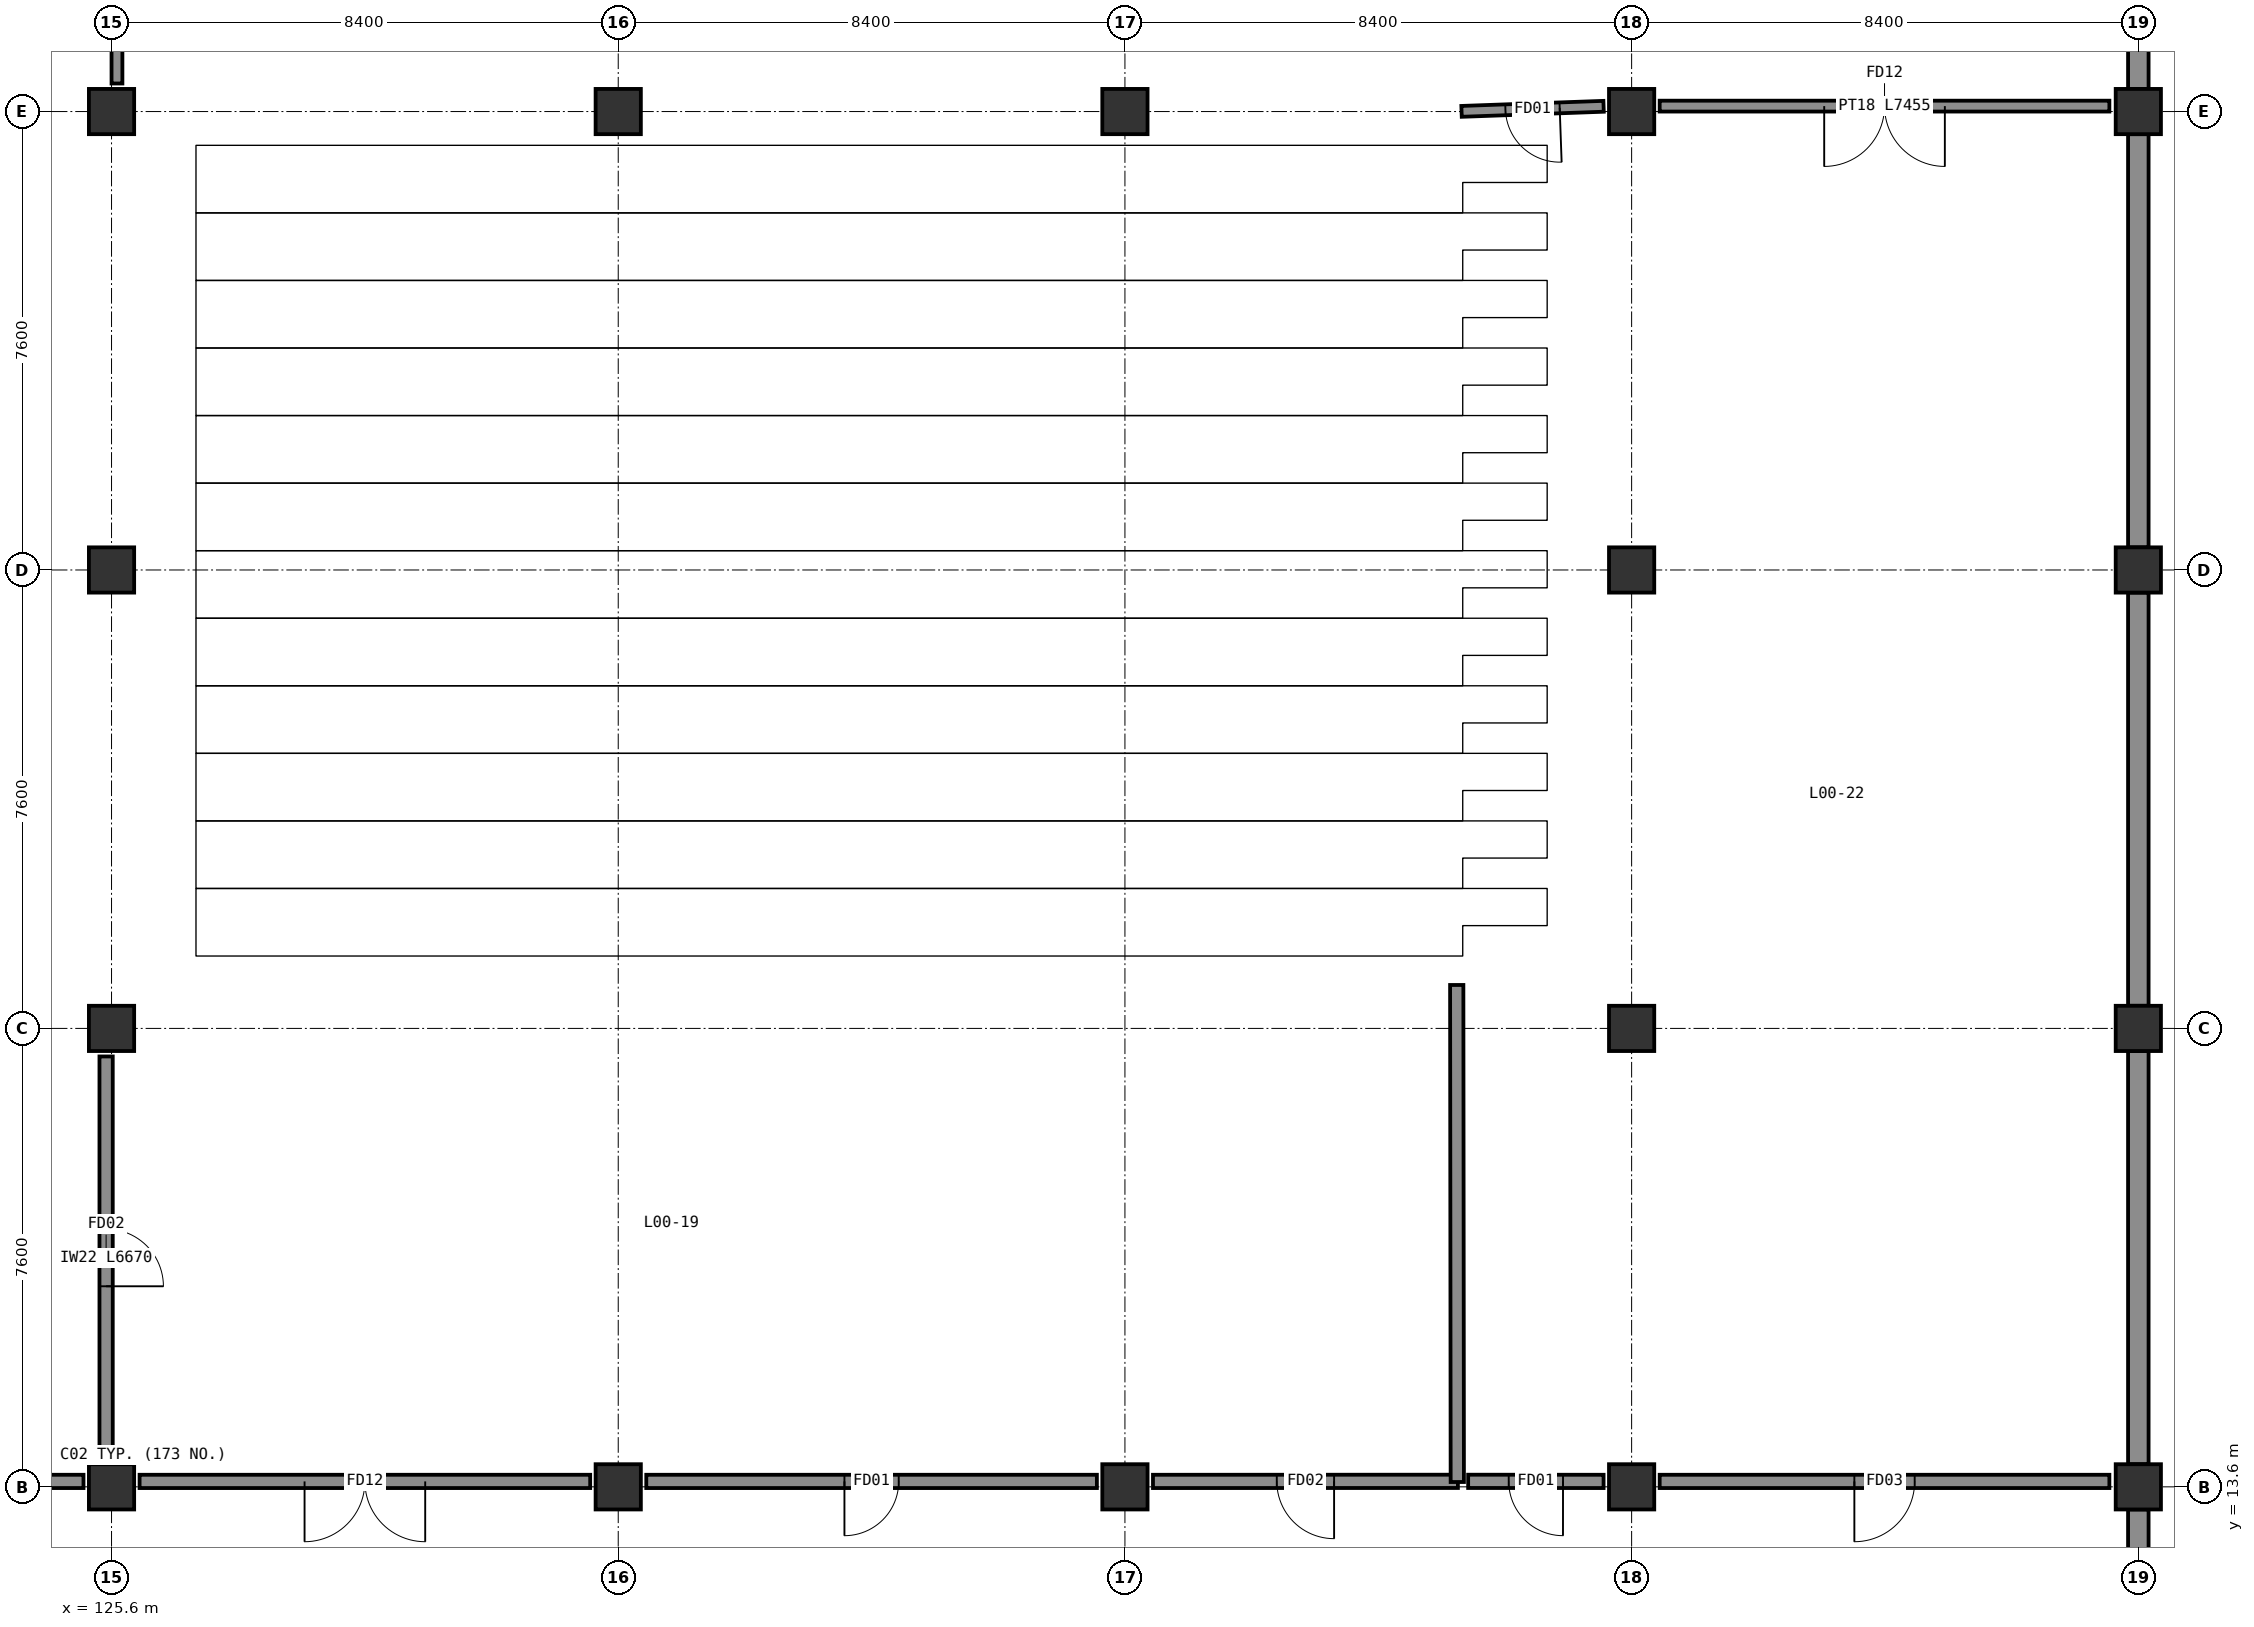
"""IFC4 building model, lengths in metres.
Left out: names, types, materials, properties, quantities, classifications, styles, units other than length and angle.
Written with IfcOpenShell. Run it as: python <this file> out.ifc"""

import sys

from ifc_helpers import new_model, si_unit, direction, frame, frame_2d, origin, origin_2d, place, context, subcontext, project, spatial, rectangle, extrude, element, fill, save


model = new_model("IFC4")
c1 = context("Model", 3, precision=1e-05, world=origin(), true_north=direction((0.0, 1.0)))
c2 = subcontext(c1, "Body", "Model", "MODEL_VIEW")
j1 = project(units=[si_unit("LENGTHUNIT", "METRE"), si_unit("PLANEANGLEUNIT", "RADIAN")], contexts=[c1])
p1 = place(None, origin())
s1 = spatial("IfcSite", under=j1, at=p1, CompositionType="ELEMENT")
p2 = place(p1, origin())
s2 = spatial("IfcBuilding", under=s1, at=p2, CompositionType="ELEMENT")
p3 = place(p2, origin())
s3 = spatial("IfcBuildingStorey", under=s2, at=p3, CompositionType="ELEMENT", Elevation=0.0)
for number, where, z_axis, x_axis in (
    (1, (125.6, 13.6, 0.0), (0.0, 0.0, 1.0), (1.0, 0.0, 0.0)),
    (2, (134.0, 13.6, 0.0), (0.0, 0.0, 1.0), (1.0, 0.0, 0.0)),
    (3, (142.4, 13.6, 0.0), (0.0, 0.0, 1.0), (1.0, 0.0, 0.0)),
    (4, (150.8, 13.6, 0.0), (0.0, 0.0, 1.0), (1.0, 0.0, 0.0)),
    (5, (159.2, 13.6, 0.0), (0.0, 0.0, 1.0), (1.0, 0.0, 0.0)),
    (6, (125.6, 21.2, 0.0), (0.0, 0.0, 1.0), (1.0, 0.0, 0.0)),
    (7, (150.8, 21.2, 0.0), (0.0, 0.0, 1.0), (1.0, 0.0, 0.0)),
    (8, (159.2, 21.2, 0.0), (0.0, 0.0, 1.0), (1.0, 0.0, 0.0)),
    (9, (125.6, 28.8, 0.0), (0.0, 0.0, 1.0), (1.0, 0.0, 0.0)),
    (10, (150.8, 28.8, 0.0), (0.0, 0.0, 1.0), (1.0, 0.0, 0.0)),
    (11, (159.2, 28.8, 0.0), (0.0, 0.0, 1.0), (1.0, 0.0, 0.0)),
    (12, (125.6, 36.4, 0.0), (0.0, 0.0, 1.0), (1.0, 0.0, 0.0)),
    (13, (134.0, 36.4, 0.0), (0.0, 0.0, 1.0), (1.0, 0.0, 0.0)),
    (14, (142.4, 36.4, 0.0), (0.0, 0.0, 1.0), (1.0, 0.0, 0.0)),
    (15, (150.8, 36.4, 0.0), (0.0, 0.0, 1.0), (1.0, 0.0, 0.0)),
    (16, (159.2, 36.4, 0.0), (0.0, 0.0, 1.0), (1.0, 0.0, 0.0)),
):
    element("IfcColumn", number, at=place(p3, frame(where, z_axis=z_axis, x_axis=x_axis)), inside=s3, PredefinedType="COLUMN", context=c2, shape_type="SweptSolid", body=[
        extrude(rectangle(XDim=0.75, YDim=0.75, at=origin_2d()), origin(), (0.0, 0.0, 1.0), 4.8),
    ])
p4 = place(p3, frame((159.2, 6.45, 0.0), z_axis=(0.0, 0.0, 1.0), x_axis=(0.0, 1.0, 0.0)))
e17 = element("IfcWall", 17, at=p4, inside=s3, PredefinedType="SOLIDWALL", context=c2, shape_type="SweptSolid", body=[
    extrude(rectangle(XDim=6.775, YDim=0.34, at=frame_2d((3.388, 0.0))), origin(), (0.0, 0.0, 1.0), 4.237),
])
p5 = place(p4, frame((2.087, 0.0, 0.0)))
e18 = element("IfcOpeningElement", 18, at=p5, cuts=e17, PredefinedType="OPENING", context=c2, shape_type="SweptSolid", body=[
    extrude(rectangle(XDim=2.6, YDim=2.2, at=frame_2d((1.3, 1.1))), frame((0.0, 0.18, 0.0), z_axis=(0.0, -1.0, 0.0), x_axis=(1.0, 0.0, 0.0)), (0.0, 0.0, 1.0), 0.36),
])
p6 = place(p3, frame((159.2, 13.975, 0.0), z_axis=(0.0, 0.0, 1.0), x_axis=(0.0, 1.0, 0.0)))
e19 = element("IfcWall", 19, at=p6, inside=s3, PredefinedType="SOLIDWALL", context=c2, shape_type="SweptSolid", body=[
    extrude(rectangle(XDim=6.85, YDim=0.34, at=frame_2d((3.425, 0.0))), origin(), (0.0, 0.0, 1.0), 4.237),
])
p7 = place(p3, frame((159.2, 21.575, 0.0), z_axis=(0.0, 0.0, 1.0), x_axis=(0.0, 1.0, 0.0)))
e20 = element("IfcWall", 20, at=p7, inside=s3, PredefinedType="SOLIDWALL", context=c2, shape_type="SweptSolid", body=[
    extrude(rectangle(XDim=6.85, YDim=0.34, at=frame_2d((3.425, 0.0))), origin(), (0.0, 0.0, 1.0), 4.237),
])
p8 = place(p3, frame((159.2, 29.175, 0.0), z_axis=(0.0, 0.0, 1.0), x_axis=(0.0, 1.0, 0.0)))
e21 = element("IfcWall", 21, at=p8, inside=s3, PredefinedType="SOLIDWALL", context=c2, shape_type="SweptSolid", body=[
    extrude(rectangle(XDim=6.85, YDim=0.34, at=frame_2d((3.425, 0.0))), origin(), (0.0, 0.0, 1.0), 4.237),
])
p9 = place(p3, frame((159.2, 36.775, 0.0), z_axis=(0.0, 0.0, 1.0), x_axis=(0.0, 1.0, 0.0)))
e22 = element("IfcWall", 22, at=p9, inside=s3, PredefinedType="SOLIDWALL", context=c2, shape_type="SweptSolid", body=[
    extrude(rectangle(XDim=6.85, YDim=0.34, at=frame_2d((3.425, 0.0))), origin(), (0.0, 0.0, 1.0), 4.237),
])
p10 = place(p9, frame((2.325, 0.0, 0.0)))
e23 = element("IfcOpeningElement", 23, at=p10, cuts=e22, PredefinedType="OPENING", context=c2, shape_type="SweptSolid", body=[
    extrude(rectangle(XDim=2.2, YDim=2.4, at=frame_2d((1.1, 1.2))), frame((0.0, 0.18, 0.0), z_axis=(0.0, -1.0, 0.0), x_axis=(1.0, 0.0, 0.0)), (0.0, 0.0, 1.0), 0.36),
])
p11 = place(p3, frame((158.72, 36.49, 0.0), z_axis=(0.0, 0.0, 1.0), x_axis=(-1.0, 0.0, 0.0)))
e24 = element("IfcWall", 24, at=p11, inside=s3, PredefinedType="PARTITIONING", context=c2, shape_type="SweptSolid", body=[
    extrude(rectangle(XDim=7.455, YDim=0.18, at=frame_2d((3.728, 0.0))), origin(), (0.0, 0.0, 1.0), 3.95),
])
p12 = place(p11, frame((2.728, 0.0, 0.0)))
e25 = element("IfcOpeningElement", 25, at=p12, cuts=e24, PredefinedType="OPENING", context=c2, shape_type="SweptSolid", body=[
    extrude(rectangle(XDim=2.0, YDim=2.25, at=frame_2d((1.0, 1.125))), frame((0.0, 0.1, 0.0), z_axis=(0.0, -1.0, 0.0), x_axis=(1.0, 0.0, 0.0)), (0.0, 0.0, 1.0), 0.2),
])
p13 = place(p3, frame((150.335, 36.487, 0.0), z_axis=(0.0, 0.0, 1.0), x_axis=(-0.999360872917, -0.03574696746, 0.0)))
e26 = element("IfcWall", 26, at=p13, inside=s3, PredefinedType="PARTITIONING", context=c2, shape_type="SweptSolid", body=[
    extrude(rectangle(XDim=2.356, YDim=0.18, at=frame_2d((1.178, 0.0))), origin(), (0.0, 0.0, 1.0), 4.187),
])
p14 = place(p13, frame((0.728, 0.0, 0.0)))
e27 = element("IfcOpeningElement", 27, at=p14, cuts=e26, PredefinedType="OPENING", context=c2, shape_type="SweptSolid", body=[
    extrude(rectangle(XDim=0.9, YDim=2.1, at=frame_2d((0.45, 1.05))), frame((0.0, 0.1, 0.0), z_axis=(0.0, -1.0, 0.0), x_axis=(1.0, 0.0, 0.0)), (0.0, 0.0, 1.0), 0.2),
])
p15 = place(p3, frame((125.51, 20.735, 0.0), z_axis=(0.0, 0.0, 1.0), x_axis=(0.0, -1.0, 0.0)))
e28 = element("IfcWall", 28, at=p15, inside=s3, PredefinedType="SOLIDWALL", context=c2, shape_type="SweptSolid", body=[
    extrude(rectangle(XDim=6.67, YDim=0.22, at=frame_2d((3.335, 0.0))), origin(), (0.0, 0.0, 1.0), 3.95),
])
p16 = place(p15, frame((2.86, 0.0, 0.0)))
e29 = element("IfcOpeningElement", 29, at=p16, cuts=e28, PredefinedType="OPENING", context=c2, shape_type="SweptSolid", body=[
    extrude(rectangle(XDim=0.95, YDim=2.1, at=frame_2d((0.475, 1.05))), frame((0.0, 0.12, 0.0), z_axis=(0.0, -1.0, 0.0), x_axis=(1.0, 0.0, 0.0)), (0.0, 0.0, 1.0), 0.24),
])
p17 = place(p3, frame((133.535, 13.69, 0.0), z_axis=(0.0, 0.0, 1.0), x_axis=(-1.0, 0.0, 0.0)))
e30 = element("IfcWall", 30, at=p17, inside=s3, PredefinedType="SOLIDWALL", context=c2, shape_type="SweptSolid", body=[
    extrude(rectangle(XDim=7.47, YDim=0.22, at=frame_2d((3.735, 0.0))), origin(), (0.0, 0.0, 1.0), 4.187),
])
p18 = place(p17, frame((2.735, 0.0, 0.0)))
e31 = element("IfcOpeningElement", 31, at=p18, cuts=e30, PredefinedType="OPENING", context=c2, shape_type="SweptSolid", body=[
    extrude(rectangle(XDim=2.0, YDim=2.25, at=frame_2d((1.0, 1.125))), frame((0.0, 0.12, 0.0), z_axis=(0.0, -1.0, 0.0), x_axis=(1.0, 0.0, 0.0)), (0.0, 0.0, 1.0), 0.24),
])
p19 = place(p3, frame((141.935, 13.69, 0.0), z_axis=(0.0, 0.0, 1.0), x_axis=(-1.0, 0.0, 0.0)))
e32 = element("IfcWall", 32, at=p19, inside=s3, PredefinedType="SOLIDWALL", context=c2, shape_type="SweptSolid", body=[
    extrude(rectangle(XDim=7.47, YDim=0.22, at=frame_2d((3.735, 0.0))), origin(), (0.0, 0.0, 1.0), 4.187),
])
p20 = place(p19, frame((3.285, 0.0, 0.0)))
e33 = element("IfcOpeningElement", 33, at=p20, cuts=e32, PredefinedType="OPENING", context=c2, shape_type="SweptSolid", body=[
    extrude(rectangle(XDim=0.9, YDim=2.1, at=frame_2d((0.45, 1.05))), frame((0.0, 0.12, 0.0), z_axis=(0.0, -1.0, 0.0), x_axis=(1.0, 0.0, 0.0)), (0.0, 0.0, 1.0), 0.24),
])
p21 = place(p3, frame((147.92, 13.691, 0.0), z_axis=(0.0, 0.0, 1.0), x_axis=(-0.999999970842, -0.000241487556, 0.0)))
e34 = element("IfcWall", 34, at=p21, inside=s3, PredefinedType="SOLIDWALL", context=c2, shape_type="SweptSolid", body=[
    extrude(rectangle(XDim=5.055, YDim=0.22, at=frame_2d((2.527, 0.0))), origin(), (0.0, 0.0, 1.0), 4.187),
])
p22 = place(p21, frame((2.052, 0.0, 0.0)))
e35 = element("IfcOpeningElement", 35, at=p22, cuts=e34, PredefinedType="OPENING", context=c2, shape_type="SweptSolid", body=[
    extrude(rectangle(XDim=0.95, YDim=2.1, at=frame_2d((0.475, 1.05))), frame((0.0, 0.12, 0.0), z_axis=(0.0, -1.0, 0.0), x_axis=(1.0, 0.0, 0.0)), (0.0, 0.0, 1.0), 0.24),
])
p23 = place(p3, frame((158.72, 13.69, 0.0), z_axis=(0.0, 0.0, 1.0), x_axis=(-1.0, 0.0, 0.0)))
e36 = element("IfcWall", 36, at=p23, inside=s3, PredefinedType="SOLIDWALL", context=c2, shape_type="SweptSolid", body=[
    extrude(rectangle(XDim=7.455, YDim=0.22, at=frame_2d((3.728, 0.0))), origin(), (0.0, 0.0, 1.0), 3.95),
])
p24 = place(p23, frame((3.228, 0.0, 0.0)))
e37 = element("IfcOpeningElement", 37, at=p24, cuts=e36, PredefinedType="OPENING", context=c2, shape_type="SweptSolid", body=[
    extrude(rectangle(XDim=1.0, YDim=2.1, at=frame_2d((0.5, 1.05))), frame((0.0, 0.12, 0.0), z_axis=(0.0, -1.0, 0.0), x_axis=(1.0, 0.0, 0.0)), (0.0, 0.0, 1.0), 0.24),
])
p25 = place(p3, frame((150.335, 13.69, 0.0), z_axis=(0.0, 0.0, 1.0), x_axis=(-0.999999852155, 0.00054377371, 0.0)))
e38 = element("IfcWall", 38, at=p25, inside=s3, PredefinedType="SOLIDWALL", context=c2, shape_type="SweptSolid", body=[
    extrude(rectangle(XDim=2.245, YDim=0.22, at=frame_2d((1.123, 0.0))), origin(), (0.0, 0.0, 1.0), 4.187),
])
p26 = place(p25, frame((0.673, 0.0, 0.0)))
e39 = element("IfcOpeningElement", 39, at=p26, cuts=e38, PredefinedType="OPENING", context=c2, shape_type="SweptSolid", body=[
    extrude(rectangle(XDim=0.9, YDim=2.1, at=frame_2d((0.45, 1.05))), frame((0.0, 0.12, 0.0), z_axis=(0.0, -1.0, 0.0), x_axis=(1.0, 0.0, 0.0)), (0.0, 0.0, 1.0), 0.24),
])
p27 = place(p3, frame((125.69, 36.865, 0.0), z_axis=(0.0, 0.0, 1.0), x_axis=(0.0, 1.0, 0.0)))
e40 = element("IfcWall", 40, at=p27, inside=s3, PredefinedType="PARTITIONING", context=c2, shape_type="SweptSolid", body=[
    extrude(rectangle(XDim=6.655, YDim=0.18, at=frame_2d((3.328, 0.0))), origin(), (0.0, 0.0, 1.0), 3.95),
])
p28 = place(p27, frame((2.427, 0.0, 0.0)))
e41 = element("IfcOpeningElement", 41, at=p28, cuts=e40, PredefinedType="OPENING", context=c2, shape_type="SweptSolid", body=[
    extrude(rectangle(XDim=1.8, YDim=2.2, at=frame_2d((0.9, 1.1))), frame((0.0, 0.1, 0.0), z_axis=(0.0, -1.0, 0.0), x_axis=(1.0, 0.0, 0.0)), (0.0, 0.0, 1.0), 0.2),
])
p29 = place(p3, frame((125.135, 13.69, 0.0), z_axis=(0.0, 0.0, 1.0), x_axis=(-1.0, 0.0, 0.0)))
e42 = element("IfcWall", 42, at=p29, inside=s3, PredefinedType="SOLIDWALL", context=c2, shape_type="SweptSolid", body=[
    extrude(rectangle(XDim=7.395, YDim=0.22, at=frame_2d((3.698, 0.0))), origin(), (0.0, 0.0, 1.0), 3.81),
])
p30 = place(p29, frame((2.748, 0.0, 0.0)))
e43 = element("IfcOpeningElement", 43, at=p30, cuts=e42, PredefinedType="OPENING", context=c2, shape_type="SweptSolid", body=[
    extrude(rectangle(XDim=1.9, YDim=2.2, at=frame_2d((0.95, 1.1))), frame((0.0, 0.12, 0.0), z_axis=(0.0, -1.0, 0.0), x_axis=(1.0, 0.0, 0.0)), (0.0, 0.0, 1.0), 0.24),
])
p31 = place(p3, frame((147.901, 21.92, 0.0), z_axis=(0.0, 0.0, 1.0), x_axis=(0.001125891853, -0.999999366184, 0.0)))
e44 = element("IfcWall", 44, at=p31, inside=s3, PredefinedType="SOLIDWALL", context=c2, shape_type="SweptSolid", body=[
    extrude(rectangle(XDim=8.24, YDim=0.22, at=frame_2d((4.12, 0.0))), origin(), (0.0, 0.0, 1.0), 4.5),
])
p32 = place(p12, origin())
e45 = element("IfcDoor", 45, at=p32, inside=s3, OperationType="DOUBLE_DOOR_SINGLE_SWING", PredefinedType="DOOR", context=c2, shape_type="SweptSolid", body=[
    extrude(rectangle(XDim=2.0, YDim=2.25, at=frame_2d((1.0, 1.125))), frame((0.0, 0.025, 0.0), z_axis=(0.0, -1.0, 0.0), x_axis=(1.0, 0.0, 0.0)), (0.0, 0.0, 1.0), 0.05),
])
fill(e25, e45)
p33 = place(p14, origin())
e46 = element("IfcDoor", 46, at=p33, inside=s3, OperationType="SINGLE_SWING_LEFT", PredefinedType="DOOR", context=c2, shape_type="SweptSolid", body=[
    extrude(rectangle(XDim=0.9, YDim=2.1, at=frame_2d((0.45, 1.05))), frame((0.0, 0.025, 0.0), z_axis=(0.0, -1.0, 0.0), x_axis=(1.0, 0.0, 0.0)), (0.0, 0.0, 1.0), 0.05),
])
fill(e27, e46)
p34 = place(p16, origin())
e47 = element("IfcDoor", 47, at=p34, inside=s3, OperationType="SINGLE_SWING_RIGHT", PredefinedType="DOOR", context=c2, shape_type="SweptSolid", body=[
    extrude(rectangle(XDim=0.95, YDim=2.1, at=frame_2d((0.475, 1.05))), frame((0.0, 0.025, 0.0), z_axis=(0.0, -1.0, 0.0), x_axis=(1.0, 0.0, 0.0)), (0.0, 0.0, 1.0), 0.05),
])
fill(e29, e47)
p35 = place(p18, origin())
e48 = element("IfcDoor", 48, at=p35, inside=s3, OperationType="DOUBLE_DOOR_SINGLE_SWING", PredefinedType="DOOR", context=c2, shape_type="SweptSolid", body=[
    extrude(rectangle(XDim=2.0, YDim=2.25, at=frame_2d((1.0, 1.125))), frame((0.0, 0.025, 0.0), z_axis=(0.0, -1.0, 0.0), x_axis=(1.0, 0.0, 0.0)), (0.0, 0.0, 1.0), 0.05),
])
fill(e31, e48)
p36 = place(p20, origin())
e49 = element("IfcDoor", 49, at=p36, inside=s3, OperationType="SINGLE_SWING_RIGHT", PredefinedType="DOOR", context=c2, shape_type="SweptSolid", body=[
    extrude(rectangle(XDim=0.9, YDim=2.1, at=frame_2d((0.45, 1.05))), frame((0.0, 0.025, 0.0), z_axis=(0.0, -1.0, 0.0), x_axis=(1.0, 0.0, 0.0)), (0.0, 0.0, 1.0), 0.05),
])
fill(e33, e49)
p37 = place(p22, origin())
e50 = element("IfcDoor", 50, at=p37, inside=s3, OperationType="SINGLE_SWING_LEFT", PredefinedType="DOOR", context=c2, shape_type="SweptSolid", body=[
    extrude(rectangle(XDim=0.95, YDim=2.1, at=frame_2d((0.475, 1.05))), frame((0.0, 0.025, 0.0), z_axis=(0.0, -1.0, 0.0), x_axis=(1.0, 0.0, 0.0)), (0.0, 0.0, 1.0), 0.05),
])
fill(e35, e50)
p38 = place(p24, origin())
e51 = element("IfcDoor", 51, at=p38, inside=s3, OperationType="SINGLE_SWING_RIGHT", PredefinedType="DOOR", context=c2, shape_type="SweptSolid", body=[
    extrude(rectangle(XDim=1.0, YDim=2.1, at=frame_2d((0.5, 1.05))), frame((0.0, 0.025, 0.0), z_axis=(0.0, -1.0, 0.0), x_axis=(1.0, 0.0, 0.0)), (0.0, 0.0, 1.0), 0.05),
])
fill(e37, e51)
p39 = place(p26, origin())
e52 = element("IfcDoor", 52, at=p39, inside=s3, OperationType="SINGLE_SWING_LEFT", PredefinedType="DOOR", context=c2, shape_type="SweptSolid", body=[
    extrude(rectangle(XDim=0.9, YDim=2.1, at=frame_2d((0.45, 1.05))), frame((0.0, 0.025, 0.0), z_axis=(0.0, -1.0, 0.0), x_axis=(1.0, 0.0, 0.0)), (0.0, 0.0, 1.0), 0.05),
])
fill(e39, e52)
save(model, sys.argv[1])
